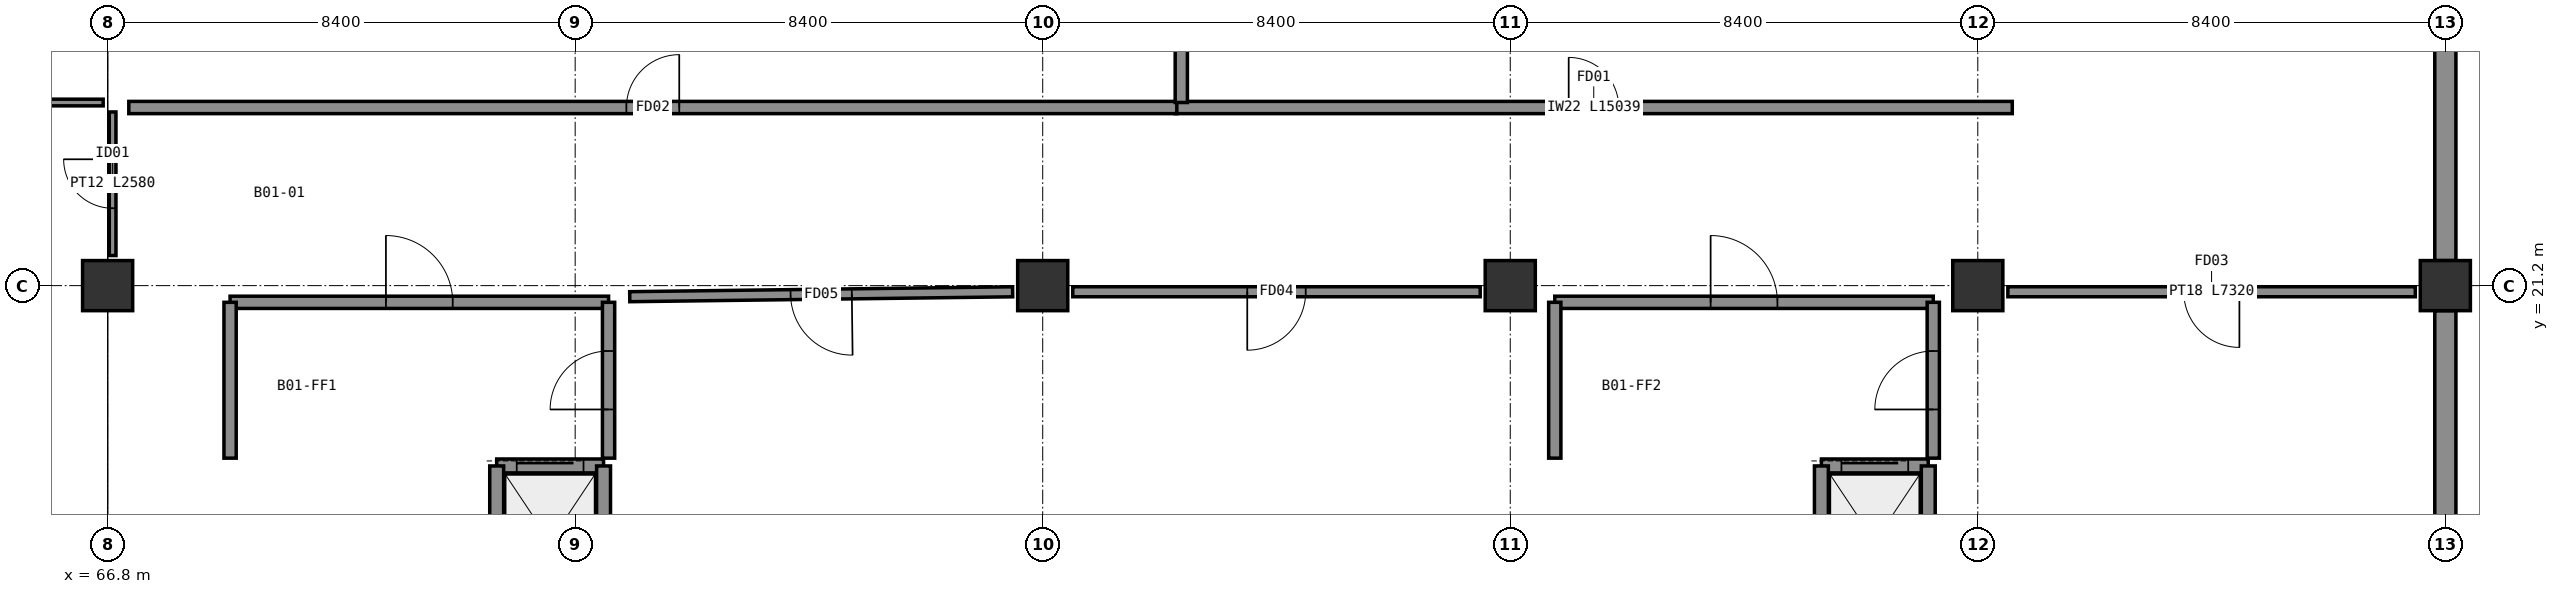
"""IFC4 building model, lengths in metres.
Left out: names, types, materials, properties, quantities, classifications, styles, units other than length and angle.
Written with IfcOpenShell. Run it as: python <this file> out.ifc"""

import sys

from ifc_helpers import new_model, si_unit, direction, frame, frame_2d, origin, origin_2d, place, context, subcontext, project, spatial, rectangle, extrude, element, fill, save


model = new_model("IFC4")
c1 = context("Model", 3, precision=1e-05, world=origin(), true_north=direction((0.0, 1.0)))
c2 = subcontext(c1, "Body", "Model", "MODEL_VIEW")
j1 = project(units=[si_unit("LENGTHUNIT", "METRE"), si_unit("PLANEANGLEUNIT", "RADIAN")], contexts=[c1])
p1 = place(None, origin())
s1 = spatial("IfcSite", under=j1, at=p1, CompositionType="ELEMENT")
p2 = place(p1, origin())
s2 = spatial("IfcBuilding", under=s1, at=p2, CompositionType="ELEMENT")
p3 = place(p2, frame((0.0, 0.0, -4.5)))
s3 = spatial("IfcBuildingStorey", under=s2, at=p3, CompositionType="ELEMENT", Elevation=-4.5)
for number, where, z_axis, x_axis in (
    (1, (66.8, 21.2, -0.4), (0.0, 0.0, 1.0), (1.0, 0.0, 0.0)),
    (2, (83.6, 21.2, -0.4), (0.0, 0.0, 1.0), (1.0, 0.0, 0.0)),
    (3, (92.0, 21.2, -0.4), (0.0, 0.0, 1.0), (1.0, 0.0, 0.0)),
    (4, (100.4, 21.2, -0.4), (0.0, 0.0, 1.0), (1.0, 0.0, 0.0)),
    (5, (108.8, 21.2, -0.4), (0.0, 0.0, 1.0), (1.0, 0.0, 0.0)),
):
    element("IfcColumn", number, at=place(p3, frame(where, z_axis=z_axis, x_axis=x_axis)), inside=s3, PredefinedType="COLUMN", context=c2, shape_type="SweptSolid", body=[
        extrude(rectangle(XDim=0.9, YDim=0.9, at=origin_2d()), origin(), (0.0, 0.0, 1.0), 4.9),
    ])
p4 = place(p3, frame((108.8, 14.05, 0.0), z_axis=(0.0, 0.0, 1.0), x_axis=(0.0, 1.0, 0.0)))
e6 = element("IfcWall", 6, at=p4, inside=s3, PredefinedType="SOLIDWALL", context=c2, shape_type="SweptSolid", body=[
    extrude(rectangle(XDim=6.7, YDim=0.38, at=frame_2d((3.35, 0.0))), origin(), (0.0, 0.0, 1.0), 3.51),
])
p5 = place(p3, frame((108.8, 21.65, 0.0), z_axis=(0.0, 0.0, 1.0), x_axis=(0.0, 1.0, 0.0)))
e7 = element("IfcWall", 7, at=p5, inside=s3, PredefinedType="SOLIDWALL", context=c2, shape_type="SweptSolid", body=[
    extrude(rectangle(XDim=6.7, YDim=0.38, at=frame_2d((3.35, 0.0))), origin(), (0.0, 0.0, 1.0), 3.51),
])
p6 = place(p3, frame((69.0, 20.9, 0.0), z_axis=(0.0, 0.0, 1.0), x_axis=(1.0, 0.0, 0.0)))
e8 = element("IfcWall", 8, at=p6, inside=s3, PredefinedType="SOLIDWALL", context=c2, shape_type="SweptSolid", body=[
    extrude(rectangle(XDim=6.8, YDim=0.22, at=frame_2d((3.4, 0.0))), origin(), (0.0, 0.0, 1.0), 4.16),
])
p7 = place(p6, frame((2.8, 0.0, 0.0)))
e9 = element("IfcOpeningElement", 9, at=p7, cuts=e8, PredefinedType="OPENING", context=c2, shape_type="SweptSolid", body=[
    extrude(rectangle(XDim=1.2, YDim=2.1, at=frame_2d((0.6, 1.05))), frame((0.0, 0.12, 0.0), z_axis=(0.0, -1.0, 0.0), x_axis=(1.0, 0.0, 0.0)), (0.0, 0.0, 1.0), 0.24),
])
p8 = place(p3, frame((69.0, 18.1, 0.0), z_axis=(0.0, 0.0, 1.0), x_axis=(0.0, 1.0, 0.0)))
e10 = element("IfcWall", 10, at=p8, inside=s3, PredefinedType="SOLIDWALL", context=c2, shape_type="SweptSolid", body=[
    extrude(rectangle(XDim=2.8, YDim=0.22, at=frame_2d((1.4, 0.0))), origin(), (0.0, 0.0, 1.0), 4.16),
])
p9 = place(p3, frame((75.8, 18.1, 0.0), z_axis=(0.0, 0.0, 1.0), x_axis=(0.0, 1.0, 0.0)))
e11 = element("IfcWall", 11, at=p9, inside=s3, PredefinedType="SOLIDWALL", context=c2, shape_type="SweptSolid", body=[
    extrude(rectangle(XDim=2.8, YDim=0.22, at=frame_2d((1.4, 0.0))), origin(), (0.0, 0.0, 1.0), 4.16),
])
p10 = place(p9, frame((0.875, 0.0, 0.0)))
e12 = element("IfcOpeningElement", 12, at=p10, cuts=e11, PredefinedType="OPENING", context=c2, shape_type="SweptSolid", body=[
    extrude(rectangle(XDim=1.05, YDim=2.1, at=frame_2d((0.525, 1.05))), frame((0.0, 0.12, 0.0), z_axis=(0.0, -1.0, 0.0), x_axis=(1.0, 0.0, 0.0)), (0.0, 0.0, 1.0), 0.24),
])
p11 = place(p3, frame((73.79, 17.96, 0.0), z_axis=(0.0, 0.0, 1.0), x_axis=(1.0, 0.0, 0.0)))
e13 = element("IfcWall", 13, at=p11, inside=s3, PredefinedType="SHEAR", context=c2, shape_type="SweptSolid", body=[
    extrude(rectangle(XDim=1.92, YDim=0.25, at=frame_2d((0.96, 0.0))), origin(), (0.0, 0.0, 1.0), 4.18),
])
p12 = place(p11, frame((0.36, 0.0, 0.0)))
e14 = element("IfcOpeningElement", 14, at=p12, cuts=e13, PredefinedType="OPENING", context=c2, shape_type="SweptSolid", body=[
    extrude(rectangle(XDim=1.2, YDim=2.2, at=frame_2d((0.6, 1.1))), frame((0.0, 0.135, 0.0), z_axis=(0.0, -1.0, 0.0), x_axis=(1.0, 0.0, 0.0)), (0.0, 0.0, 1.0), 0.27),
])
for number, where, z_axis, x_axis in (
    (15, (73.79, 15.24, 0.0), (0.0, 0.0, 1.0), (0.0, 1.0, 0.0)),
    (16, (75.71, 15.24, 0.0), (0.0, 0.0, 1.0), (0.0, 1.0, 0.0)),
):
    element("IfcWall", number, at=place(p3, frame(where, z_axis=z_axis, x_axis=x_axis)), inside=s3, PredefinedType="SHEAR", context=c2, shape_type="SweptSolid", body=[
        extrude(rectangle(XDim=2.72, YDim=0.25, at=frame_2d((1.36, 0.0))), origin(), (0.0, 0.0, 1.0), 4.18),
    ])
p13 = place(p3, frame((92.8, 20.9, 0.0), z_axis=(0.0, 0.0, 1.0), x_axis=(1.0, 0.0, 0.0)))
e17 = element("IfcWall", 17, at=p13, inside=s3, PredefinedType="SOLIDWALL", context=c2, shape_type="SweptSolid", body=[
    extrude(rectangle(XDim=6.8, YDim=0.22, at=frame_2d((3.4, 0.0))), origin(), (0.0, 0.0, 1.0), 4.16),
])
p14 = place(p13, frame((2.8, 0.0, 0.0)))
e18 = element("IfcOpeningElement", 18, at=p14, cuts=e17, PredefinedType="OPENING", context=c2, shape_type="SweptSolid", body=[
    extrude(rectangle(XDim=1.2, YDim=2.1, at=frame_2d((0.6, 1.05))), frame((0.0, 0.12, 0.0), z_axis=(0.0, -1.0, 0.0), x_axis=(1.0, 0.0, 0.0)), (0.0, 0.0, 1.0), 0.24),
])
p15 = place(p3, frame((92.8, 18.1, 0.0), z_axis=(0.0, 0.0, 1.0), x_axis=(0.0, 1.0, 0.0)))
e19 = element("IfcWall", 19, at=p15, inside=s3, PredefinedType="SOLIDWALL", context=c2, shape_type="SweptSolid", body=[
    extrude(rectangle(XDim=2.8, YDim=0.22, at=frame_2d((1.4, 0.0))), origin(), (0.0, 0.0, 1.0), 4.16),
])
p16 = place(p3, frame((99.6, 18.1, 0.0), z_axis=(0.0, 0.0, 1.0), x_axis=(0.0, 1.0, 0.0)))
e20 = element("IfcWall", 20, at=p16, inside=s3, PredefinedType="SOLIDWALL", context=c2, shape_type="SweptSolid", body=[
    extrude(rectangle(XDim=2.8, YDim=0.22, at=frame_2d((1.4, 0.0))), origin(), (0.0, 0.0, 1.0), 4.16),
])
p17 = place(p16, frame((0.875, 0.0, 0.0)))
e21 = element("IfcOpeningElement", 21, at=p17, cuts=e20, PredefinedType="OPENING", context=c2, shape_type="SweptSolid", body=[
    extrude(rectangle(XDim=1.05, YDim=2.1, at=frame_2d((0.525, 1.05))), frame((0.0, 0.12, 0.0), z_axis=(0.0, -1.0, 0.0), x_axis=(1.0, 0.0, 0.0)), (0.0, 0.0, 1.0), 0.24),
])
p18 = place(p3, frame((97.59, 17.96, 0.0), z_axis=(0.0, 0.0, 1.0), x_axis=(1.0, 0.0, 0.0)))
e22 = element("IfcWall", 22, at=p18, inside=s3, PredefinedType="SHEAR", context=c2, shape_type="SweptSolid", body=[
    extrude(rectangle(XDim=1.92, YDim=0.25, at=frame_2d((0.96, 0.0))), origin(), (0.0, 0.0, 1.0), 4.18),
])
p19 = place(p18, frame((0.36, 0.0, 0.0)))
e23 = element("IfcOpeningElement", 23, at=p19, cuts=e22, PredefinedType="OPENING", context=c2, shape_type="SweptSolid", body=[
    extrude(rectangle(XDim=1.2, YDim=2.2, at=frame_2d((0.6, 1.1))), frame((0.0, 0.135, 0.0), z_axis=(0.0, -1.0, 0.0), x_axis=(1.0, 0.0, 0.0)), (0.0, 0.0, 1.0), 0.27),
])
for number, where, z_axis, x_axis in (
    (24, (97.59, 15.24, 0.0), (0.0, 0.0, 1.0), (0.0, 1.0, 0.0)),
    (25, (99.51, 15.24, 0.0), (0.0, 0.0, 1.0), (0.0, 1.0, 0.0)),
):
    element("IfcWall", number, at=place(p3, frame(where, z_axis=z_axis, x_axis=x_axis)), inside=s3, PredefinedType="SHEAR", context=c2, shape_type="SweptSolid", body=[
        extrude(rectangle(XDim=2.72, YDim=0.25, at=frame_2d((1.36, 0.0))), origin(), (0.0, 0.0, 1.0), 4.18),
    ])
p20 = place(p3, frame((85.98, 24.4, 0.0), z_axis=(0.0, 0.0, 1.0), x_axis=(1.0, 0.0, 0.0)))
e26 = element("IfcWall", 26, at=p20, inside=s3, PredefinedType="SOLIDWALL", context=c2, shape_type="SweptSolid", body=[
    extrude(rectangle(XDim=15.039, YDim=0.22, at=frame_2d((7.52, 0.0))), origin(), (0.0, 0.0, 1.0), 4.16),
])
p21 = place(p20, frame((7.07, 0.0, 0.0)))
e27 = element("IfcOpeningElement", 27, at=p21, cuts=e26, PredefinedType="OPENING", context=c2, shape_type="SweptSolid", body=[
    extrude(rectangle(XDim=0.9, YDim=2.1, at=frame_2d((0.45, 1.05))), frame((0.0, 0.12, 0.0), z_axis=(0.0, -1.0, 0.0), x_axis=(1.0, 0.0, 0.0)), (0.0, 0.0, 1.0), 0.24),
])
p22 = place(p3, frame((67.18, 24.4, 0.0), z_axis=(0.0, 0.0, 1.0), x_axis=(1.0, 0.0, 0.0)))
e28 = element("IfcWall", 28, at=p22, inside=s3, PredefinedType="SOLIDWALL", context=c2, shape_type="SweptSolid", body=[
    extrude(rectangle(XDim=18.829, YDim=0.22, at=frame_2d((9.415, 0.0))), origin(), (0.0, 0.0, 1.0), 4.16),
])
p23 = place(p22, frame((8.939, 0.0, 0.0)))
e29 = element("IfcOpeningElement", 29, at=p23, cuts=e28, PredefinedType="OPENING", context=c2, shape_type="SweptSolid", body=[
    extrude(rectangle(XDim=0.95, YDim=2.1, at=frame_2d((0.475, 1.05))), frame((0.0, 0.12, 0.0), z_axis=(0.0, -1.0, 0.0), x_axis=(1.0, 0.0, 0.0)), (0.0, 0.0, 1.0), 0.24),
])
p24 = place(p3, frame((108.26, 21.09, 0.0), z_axis=(0.0, 0.0, 1.0), x_axis=(-1.0, 0.0, 0.0)))
e30 = element("IfcWall", 30, at=p24, inside=s3, PredefinedType="PARTITIONING", context=c2, shape_type="SweptSolid", body=[
    extrude(rectangle(XDim=7.32, YDim=0.18, at=frame_2d((3.66, 0.0))), origin(), (0.0, 0.0, 1.0), 3.51),
])
p25 = place(p24, frame((3.16, 0.0, 0.0)))
e31 = element("IfcOpeningElement", 31, at=p25, cuts=e30, PredefinedType="OPENING", context=c2, shape_type="SweptSolid", body=[
    extrude(rectangle(XDim=1.0, YDim=2.1, at=frame_2d((0.5, 1.05))), frame((0.0, 0.1, 0.0), z_axis=(0.0, -1.0, 0.0), x_axis=(1.0, 0.0, 0.0)), (0.0, 0.0, 1.0), 0.2),
])
p26 = place(p3, frame((91.46, 21.09, 0.0), z_axis=(0.0, 0.0, 1.0), x_axis=(-1.0, 0.0, 0.0)))
e32 = element("IfcWall", 32, at=p26, inside=s3, PredefinedType="PARTITIONING", context=c2, shape_type="SweptSolid", body=[
    extrude(rectangle(XDim=7.32, YDim=0.18, at=frame_2d((3.66, 0.0))), origin(), (0.0, 0.0, 1.0), 3.51),
])
p27 = place(p26, frame((3.135, 0.0, 0.0)))
e33 = element("IfcOpeningElement", 33, at=p27, cuts=e32, PredefinedType="OPENING", context=c2, shape_type="SweptSolid", body=[
    extrude(rectangle(XDim=1.05, YDim=2.1, at=frame_2d((0.525, 1.05))), frame((0.0, 0.1, 0.0), z_axis=(0.0, -1.0, 0.0), x_axis=(1.0, 0.0, 0.0)), (0.0, 0.0, 1.0), 0.2),
])
p28 = place(p3, frame((83.06, 21.089, 0.0), z_axis=(0.0, 0.0, 1.0), x_axis=(-0.99991794977, -0.012809907373, 0.0)))
e34 = element("IfcWall", 34, at=p28, inside=s3, PredefinedType="PARTITIONING", context=c2, shape_type="SweptSolid", body=[
    extrude(rectangle(XDim=6.88, YDim=0.18, at=frame_2d((3.44, 0.0))), origin(), (0.0, 0.0, 1.0), 3.36),
])
p29 = place(p28, frame((2.89, 0.0, 0.0)))
e35 = element("IfcOpeningElement", 35, at=p29, cuts=e34, PredefinedType="OPENING", context=c2, shape_type="SweptSolid", body=[
    extrude(rectangle(XDim=1.1, YDim=2.1, at=frame_2d((0.55, 1.05))), frame((0.0, 0.1, 0.0), z_axis=(0.0, -1.0, 0.0), x_axis=(1.0, 0.0, 0.0)), (0.0, 0.0, 1.0), 0.2),
])
p30 = place(p3, frame((66.89, 21.74, 0.0), z_axis=(0.0, 0.0, 1.0), x_axis=(-0.000189250564, 0.999999982092, 0.0)))
e36 = element("IfcWall", 36, at=p30, inside=s3, PredefinedType="PARTITIONING", context=c2, shape_type="SweptSolid", body=[
    extrude(rectangle(XDim=2.58, YDim=0.12, at=frame_2d((1.29, 0.0))), origin(), (0.0, 0.0, 1.0), 3.51),
])
p31 = place(p30, frame((0.85, 0.0, 0.0)))
e37 = element("IfcOpeningElement", 37, at=p31, cuts=e36, PredefinedType="OPENING", context=c2, shape_type="SweptSolid", body=[
    extrude(rectangle(XDim=0.88, YDim=2.08, at=frame_2d((0.44, 1.04))), frame((0.0, 0.07, 0.0), z_axis=(0.0, -1.0, 0.0), x_axis=(1.0, 0.0, 0.0)), (0.0, 0.0, 1.0), 0.14),
])
p32 = place(p3, frame((66.72, 24.49, 0.0), z_axis=(0.0, 0.0, 1.0), x_axis=(-0.999999823344, 0.000594400927, 0.0)))
e38 = element("IfcWall", 38, at=p32, inside=s3, PredefinedType="PARTITIONING", context=c2, shape_type="SweptSolid", body=[
    extrude(rectangle(XDim=16.84, YDim=0.12, at=frame_2d((8.42, 0.0))), origin(), (0.0, 0.0, 1.0), 4.16),
])
p33 = place(p32, frame((7.96, 0.0, 0.0)))
e39 = element("IfcOpeningElement", 39, at=p33, cuts=e38, PredefinedType="OPENING", context=c2, shape_type="SweptSolid", body=[
    extrude(rectangle(XDim=0.92, YDim=2.08, at=frame_2d((0.46, 1.04))), frame((0.0, 0.07, 0.0), z_axis=(0.0, -1.0, 0.0), x_axis=(1.0, 0.0, 0.0)), (0.0, 0.0, 1.0), 0.14),
])
p34 = place(p3, frame((86.09, 24.49, 0.0), z_axis=(0.0, 0.0, 1.0), x_axis=(0.0, 1.0, 0.0)))
e40 = element("IfcWall", 40, at=p34, inside=s3, PredefinedType="SOLIDWALL", context=c2, shape_type="SweptSolid", body=[
    extrude(rectangle(XDim=11.51, YDim=0.22, at=frame_2d((5.755, 0.0))), origin(), (0.0, 0.0, 1.0), 4.16),
])
p35 = place(p7, origin())
e41 = element("IfcDoor", 41, at=p35, inside=s3, OperationType="SINGLE_SWING_LEFT", PredefinedType="DOOR", context=c2, shape_type="SweptSolid", body=[
    extrude(rectangle(XDim=1.2, YDim=2.1, at=frame_2d((0.6, 1.05))), frame((0.0, 0.025, 0.0), z_axis=(0.0, -1.0, 0.0), x_axis=(1.0, 0.0, 0.0)), (0.0, 0.0, 1.0), 0.05),
])
fill(e9, e41)
p36 = place(p10, origin())
e42 = element("IfcDoor", 42, at=p36, inside=s3, OperationType="SINGLE_SWING_LEFT", PredefinedType="DOOR", context=c2, shape_type="SweptSolid", body=[
    extrude(rectangle(XDim=1.05, YDim=2.1, at=frame_2d((0.525, 1.05))), frame((0.0, 0.025, 0.0), z_axis=(0.0, -1.0, 0.0), x_axis=(1.0, 0.0, 0.0)), (0.0, 0.0, 1.0), 0.05),
])
fill(e12, e42)
p37 = place(p12, origin())
e43 = element("IfcDoor", 43, at=p37, inside=s3, OperationType="SLIDING_TO_LEFT", PredefinedType="DOOR", context=c2, shape_type="SweptSolid", body=[
    extrude(rectangle(XDim=1.2, YDim=2.2, at=frame_2d((0.6, 1.1))), frame((0.0, 0.025, 0.0), z_axis=(0.0, -1.0, 0.0), x_axis=(1.0, 0.0, 0.0)), (0.0, 0.0, 1.0), 0.05),
])
fill(e14, e43)
p38 = place(p14, origin())
e44 = element("IfcDoor", 44, at=p38, inside=s3, OperationType="SINGLE_SWING_LEFT", PredefinedType="DOOR", context=c2, shape_type="SweptSolid", body=[
    extrude(rectangle(XDim=1.2, YDim=2.1, at=frame_2d((0.6, 1.05))), frame((0.0, 0.025, 0.0), z_axis=(0.0, -1.0, 0.0), x_axis=(1.0, 0.0, 0.0)), (0.0, 0.0, 1.0), 0.05),
])
fill(e18, e44)
p39 = place(p17, origin())
e45 = element("IfcDoor", 45, at=p39, inside=s3, OperationType="SINGLE_SWING_LEFT", PredefinedType="DOOR", context=c2, shape_type="SweptSolid", body=[
    extrude(rectangle(XDim=1.05, YDim=2.1, at=frame_2d((0.525, 1.05))), frame((0.0, 0.025, 0.0), z_axis=(0.0, -1.0, 0.0), x_axis=(1.0, 0.0, 0.0)), (0.0, 0.0, 1.0), 0.05),
])
fill(e21, e45)
p40 = place(p19, origin())
e46 = element("IfcDoor", 46, at=p40, inside=s3, OperationType="SLIDING_TO_LEFT", PredefinedType="DOOR", context=c2, shape_type="SweptSolid", body=[
    extrude(rectangle(XDim=1.2, YDim=2.2, at=frame_2d((0.6, 1.1))), frame((0.0, 0.025, 0.0), z_axis=(0.0, -1.0, 0.0), x_axis=(1.0, 0.0, 0.0)), (0.0, 0.0, 1.0), 0.05),
])
fill(e23, e46)
p41 = place(p21, origin())
e47 = element("IfcDoor", 47, at=p41, inside=s3, OperationType="SINGLE_SWING_LEFT", PredefinedType="DOOR", context=c2, shape_type="SweptSolid", body=[
    extrude(rectangle(XDim=0.9, YDim=2.1, at=frame_2d((0.45, 1.05))), frame((0.0, 0.025, 0.0), z_axis=(0.0, -1.0, 0.0), x_axis=(1.0, 0.0, 0.0)), (0.0, 0.0, 1.0), 0.05),
])
fill(e27, e47)
p42 = place(p23, origin())
e48 = element("IfcDoor", 48, at=p42, inside=s3, OperationType="SINGLE_SWING_RIGHT", PredefinedType="DOOR", context=c2, shape_type="SweptSolid", body=[
    extrude(rectangle(XDim=0.95, YDim=2.1, at=frame_2d((0.475, 1.05))), frame((0.0, 0.025, 0.0), z_axis=(0.0, -1.0, 0.0), x_axis=(1.0, 0.0, 0.0)), (0.0, 0.0, 1.0), 0.05),
])
fill(e29, e48)
p43 = place(p25, origin())
e49 = element("IfcDoor", 49, at=p43, inside=s3, OperationType="SINGLE_SWING_LEFT", PredefinedType="DOOR", context=c2, shape_type="SweptSolid", body=[
    extrude(rectangle(XDim=1.0, YDim=2.1, at=frame_2d((0.5, 1.05))), frame((0.0, 0.025, 0.0), z_axis=(0.0, -1.0, 0.0), x_axis=(1.0, 0.0, 0.0)), (0.0, 0.0, 1.0), 0.05),
])
fill(e31, e49)
p44 = place(p27, origin())
e50 = element("IfcDoor", 50, at=p44, inside=s3, OperationType="SINGLE_SWING_RIGHT", PredefinedType="DOOR", context=c2, shape_type="SweptSolid", body=[
    extrude(rectangle(XDim=1.05, YDim=2.1, at=frame_2d((0.525, 1.05))), frame((0.0, 0.025, 0.0), z_axis=(0.0, -1.0, 0.0), x_axis=(1.0, 0.0, 0.0)), (0.0, 0.0, 1.0), 0.05),
])
fill(e33, e50)
p45 = place(p29, origin())
e51 = element("IfcDoor", 51, at=p45, inside=s3, OperationType="SINGLE_SWING_LEFT", PredefinedType="DOOR", context=c2, shape_type="SweptSolid", body=[
    extrude(rectangle(XDim=1.1, YDim=2.1, at=frame_2d((0.55, 1.05))), frame((0.0, 0.025, 0.0), z_axis=(0.0, -1.0, 0.0), x_axis=(1.0, 0.0, 0.0)), (0.0, 0.0, 1.0), 0.05),
])
fill(e35, e51)
p46 = place(p31, origin())
e52 = element("IfcDoor", 52, at=p46, inside=s3, OperationType="SINGLE_SWING_RIGHT", PredefinedType="DOOR", context=c2, shape_type="SweptSolid", body=[
    extrude(rectangle(XDim=0.88, YDim=2.08, at=frame_2d((0.44, 1.04))), frame((0.0, 0.025, 0.0), z_axis=(0.0, -1.0, 0.0), x_axis=(1.0, 0.0, 0.0)), (0.0, 0.0, 1.0), 0.05),
])
fill(e37, e52)
save(model, sys.argv[1])
